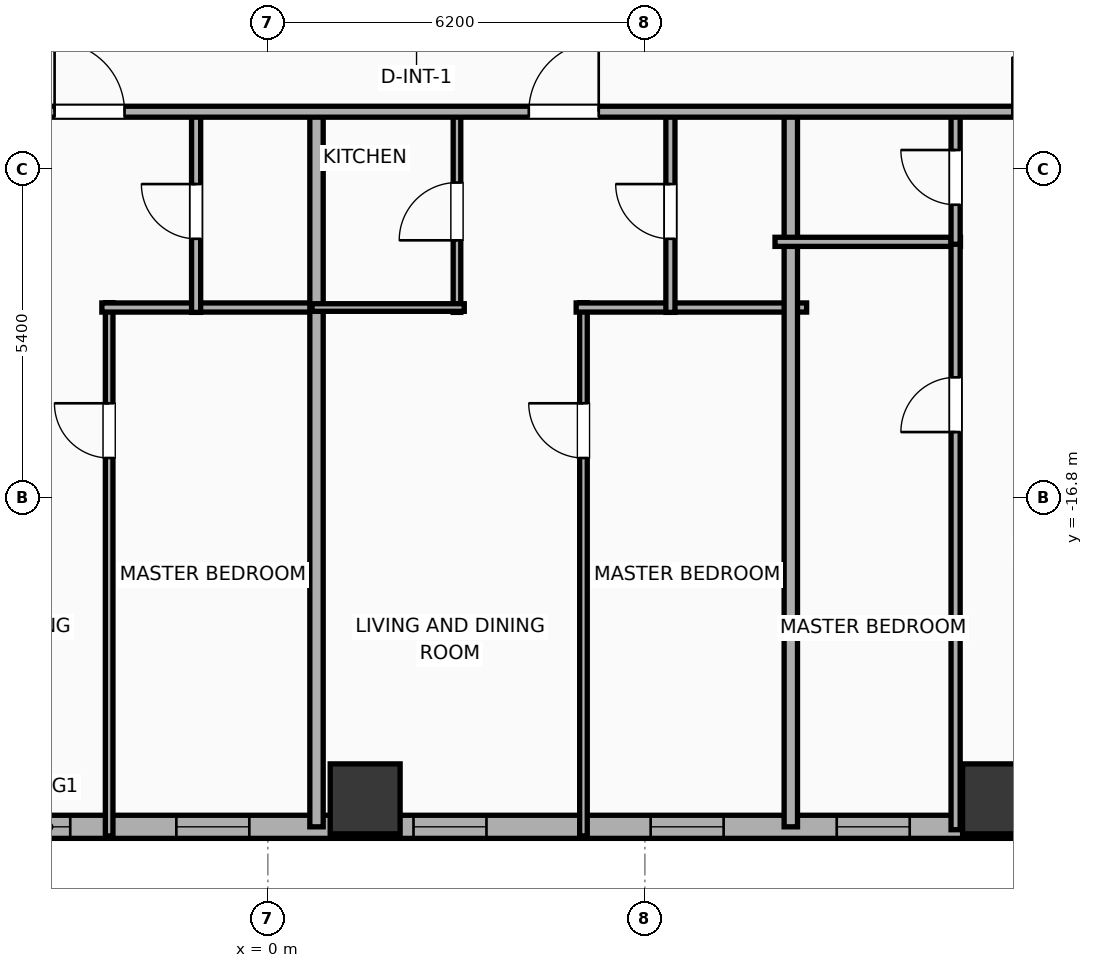
"""IFC4 building model, lengths in metres.
Left out: names, types, materials, properties, quantities, classifications, styles, units other than length and angle.
Written with IfcOpenShell. Run it as: python <this file> out.ifc"""

import sys

from ifc_helpers import new_model, si_unit, direction, frame, frame_2d, origin, origin_2d, place, context, subcontext, project, spatial, rectangle, hollow_rectangle, extrude, element, fill, save


model = new_model("IFC4")
c1 = context("Model", 3, precision=1e-05, world=origin(), true_north=direction((0.0, 1.0)))
c2 = subcontext(c1, "Body", "Model", "MODEL_VIEW")
j1 = project(units=[si_unit("LENGTHUNIT", "METRE"), si_unit("PLANEANGLEUNIT", "RADIAN")], contexts=[c1])
p1 = place(None, origin())
s1 = spatial("IfcSite", under=j1, at=p1, CompositionType="ELEMENT")
p2 = place(p1, origin())
s2 = spatial("IfcBuilding", under=s1, at=p2, CompositionType="ELEMENT")
p3 = place(p2, frame((0.0, 0.0, 57.2)))
s3 = spatial("IfcBuildingStorey", under=s2, at=p3, CompositionType="ELEMENT", Elevation=57.2)
for number, where, z_axis, x_axis in (
    (1, (1.6, -21.75, 0.0), (0.0, 0.0, 1.0), (1.0, 0.0, 0.0)),
    (2, (12.0, -21.75, 0.0), (0.0, 0.0, 1.0), (1.0, 0.0, 0.0)),
):
    element("IfcColumn", number, at=place(p3, frame(where, z_axis=z_axis, x_axis=x_axis)), inside=s3, PredefinedType="COLUMN", context=c2, shape_type="SweptSolid", body=[
        extrude(hollow_rectangle(XDim=1.15, YDim=1.15, WallThickness=0.04, at=origin_2d()), origin(), (0.0, 0.0, 1.0), 3.9),
    ])
p4 = place(p3, frame((22.381, -22.21, 0.0), z_axis=(0.0, 0.0, 1.0), x_axis=(-1.0, 0.0, 0.0)))
e3 = element("IfcWall", 3, at=p4, inside=s3, PredefinedType="ELEMENTEDWALL", context=c2, shape_type="SweptSolid", body=[
    extrude(rectangle(XDim=51.963, YDim=0.38, at=frame_2d((25.981, 0.0))), origin(), (0.0, 0.0, 1.0), 3.65),
])
p5 = place(p4, frame((6.61, 0.0, 0.75)))
e4 = element("IfcOpeningElement", 4, at=p5, cuts=e3, PredefinedType="OPENING", context=c2, shape_type="SweptSolid", body=[
    extrude(rectangle(XDim=2.4, YDim=2.1, at=frame_2d((1.2, 1.05))), frame((0.0, 0.2, 0.0), z_axis=(0.0, -1.0, 0.0), x_axis=(1.0, 0.0, 0.0)), (0.0, 0.0, 1.0), 0.4),
])
p6 = place(p4, frame((25.631, 0.0, 0.75)))
e5 = element("IfcOpeningElement", 5, at=p6, cuts=e3, PredefinedType="OPENING", context=c2, shape_type="SweptSolid", body=[
    extrude(rectangle(XDim=2.4, YDim=2.1, at=frame_2d((1.2, 1.05))), frame((0.0, 0.2, 0.0), z_axis=(0.0, -1.0, 0.0), x_axis=(1.0, 0.0, 0.0)), (0.0, 0.0, 1.0), 0.4),
])
p7 = place(p4, frame((49.132, 0.0, 0.75)))
e6 = element("IfcOpeningElement", 6, at=p7, cuts=e3, PredefinedType="OPENING", context=c2, shape_type="SweptSolid", body=[
    extrude(rectangle(XDim=1.2, YDim=2.05, at=frame_2d((0.6, 1.025))), frame((0.0, 0.2, 0.0), z_axis=(0.0, -1.0, 0.0), x_axis=(1.0, 0.0, 0.0)), (0.0, 0.0, 1.0), 0.4),
])
p8 = place(p4, frame((46.086, 0.0, 0.75)))
e7 = element("IfcOpeningElement", 7, at=p8, cuts=e3, PredefinedType="OPENING", context=c2, shape_type="SweptSolid", body=[
    extrude(rectangle(XDim=1.2, YDim=2.05, at=frame_2d((0.6, 1.025))), frame((0.0, 0.2, 0.0), z_axis=(0.0, -1.0, 0.0), x_axis=(1.0, 0.0, 0.0)), (0.0, 0.0, 1.0), 0.4),
])
p9 = place(p4, frame((42.426, 0.0, 0.75)))
e8 = element("IfcOpeningElement", 8, at=p9, cuts=e3, PredefinedType="OPENING", context=c2, shape_type="SweptSolid", body=[
    extrude(rectangle(XDim=1.2, YDim=2.05, at=frame_2d((0.6, 1.025))), frame((0.0, 0.2, 0.0), z_axis=(0.0, -1.0, 0.0), x_axis=(1.0, 0.0, 0.0)), (0.0, 0.0, 1.0), 0.4),
])
p10 = place(p4, frame((38.286, 0.0, 0.75)))
e9 = element("IfcOpeningElement", 9, at=p10, cuts=e3, PredefinedType="OPENING", context=c2, shape_type="SweptSolid", body=[
    extrude(rectangle(XDim=1.2, YDim=2.05, at=frame_2d((0.6, 1.025))), frame((0.0, 0.2, 0.0), z_axis=(0.0, -1.0, 0.0), x_axis=(1.0, 0.0, 0.0)), (0.0, 0.0, 1.0), 0.4),
])
p11 = place(p4, frame((35.219, 0.0, 0.75)))
e10 = element("IfcOpeningElement", 10, at=p11, cuts=e3, PredefinedType="OPENING", context=c2, shape_type="SweptSolid", body=[
    extrude(rectangle(XDim=1.2, YDim=2.05, at=frame_2d((0.6, 1.025))), frame((0.0, 0.2, 0.0), z_axis=(0.0, -1.0, 0.0), x_axis=(1.0, 0.0, 0.0)), (0.0, 0.0, 1.0), 0.4),
])
p12 = place(p4, frame((32.039, 0.0, 0.75)))
e11 = element("IfcOpeningElement", 11, at=p12, cuts=e3, PredefinedType="OPENING", context=c2, shape_type="SweptSolid", body=[
    extrude(rectangle(XDim=1.2, YDim=2.05, at=frame_2d((0.6, 1.025))), frame((0.0, 0.2, 0.0), z_axis=(0.0, -1.0, 0.0), x_axis=(1.0, 0.0, 0.0)), (0.0, 0.0, 1.0), 0.4),
])
p13 = place(p4, frame((22.686, 0.0, 0.75)))
e12 = element("IfcOpeningElement", 12, at=p13, cuts=e3, PredefinedType="OPENING", context=c2, shape_type="SweptSolid", body=[
    extrude(rectangle(XDim=1.2, YDim=2.05, at=frame_2d((0.6, 1.025))), frame((0.0, 0.2, 0.0), z_axis=(0.0, -1.0, 0.0), x_axis=(1.0, 0.0, 0.0)), (0.0, 0.0, 1.0), 0.4),
])
p14 = place(p4, frame((18.786, 0.0, 0.75)))
e13 = element("IfcOpeningElement", 13, at=p14, cuts=e3, PredefinedType="OPENING", context=c2, shape_type="SweptSolid", body=[
    extrude(rectangle(XDim=1.2, YDim=2.05, at=frame_2d((0.6, 1.025))), frame((0.0, 0.2, 0.0), z_axis=(0.0, -1.0, 0.0), x_axis=(1.0, 0.0, 0.0)), (0.0, 0.0, 1.0), 0.4),
])
p15 = place(p4, frame((14.886, 0.0, 0.75)))
e14 = element("IfcOpeningElement", 14, at=p15, cuts=e3, PredefinedType="OPENING", context=c2, shape_type="SweptSolid", body=[
    extrude(rectangle(XDim=1.2, YDim=2.05, at=frame_2d((0.6, 1.025))), frame((0.0, 0.2, 0.0), z_axis=(0.0, -1.0, 0.0), x_axis=(1.0, 0.0, 0.0)), (0.0, 0.0, 1.0), 0.4),
])
p16 = place(p4, frame((11.826, 0.0, 0.75)))
e15 = element("IfcOpeningElement", 15, at=p16, cuts=e3, PredefinedType="OPENING", context=c2, shape_type="SweptSolid", body=[
    extrude(rectangle(XDim=1.2, YDim=2.05, at=frame_2d((0.6, 1.025))), frame((0.0, 0.2, 0.0), z_axis=(0.0, -1.0, 0.0), x_axis=(1.0, 0.0, 0.0)), (0.0, 0.0, 1.0), 0.4),
])
p17 = place(p4, frame((2.836, 0.0, 0.75)))
e16 = element("IfcOpeningElement", 16, at=p17, cuts=e3, PredefinedType="OPENING", context=c2, shape_type="SweptSolid", body=[
    extrude(rectangle(XDim=1.2, YDim=2.05, at=frame_2d((0.6, 1.025))), frame((0.0, 0.2, 0.0), z_axis=(0.0, -1.0, 0.0), x_axis=(1.0, 0.0, 0.0)), (0.0, 0.0, 1.0), 0.4),
])
p18 = place(p3, frame((-2.61, -22.36, 0.0), z_axis=(0.0, 0.0, 1.0), x_axis=(0.0, 1.0, 0.0)))
e17 = element("IfcWall", 17, at=p18, inside=s3, PredefinedType="PARTITIONING", context=c2, shape_type="SweptSolid", body=[
    extrude(rectangle(XDim=8.77, YDim=0.125, at=frame_2d((4.385, 0.0))), origin(), (0.0, 0.0, 1.0), 3.65),
])
p19 = place(p18, frame((6.215, 0.0, 0.0)))
e18 = element("IfcOpeningElement", 18, at=p19, cuts=e17, PredefinedType="OPENING", context=c2, shape_type="SweptSolid", body=[
    extrude(rectangle(XDim=0.9, YDim=2.05, at=frame_2d((0.45, 1.025))), frame((0.0, 0.073, 0.0), z_axis=(0.0, -1.0, 0.0), x_axis=(1.0, 0.0, 0.0)), (0.0, 0.0, 1.0), 0.145),
])
p20 = place(p3, frame((-2.73, -13.67, 0.0), z_axis=(0.0, 0.0, 1.0), x_axis=(1.0, 0.0, 0.0)))
e19 = element("IfcWall", 19, at=p20, inside=s3, PredefinedType="PLUMBINGWALL", context=c2, shape_type="SweptSolid", body=[
    extrude(rectangle(XDim=3.605, YDim=0.15, at=frame_2d((1.802, 0.0))), origin(), (0.0, 0.0, 1.0), 3.65),
])
p21 = place(p3, frame((-1.18, -13.75, 0.0), z_axis=(0.0, 0.0, 1.0), x_axis=(0.0, 1.0, 0.0)))
e20 = element("IfcWall", 20, at=p21, inside=s3, PredefinedType="PLUMBINGWALL", context=c2, shape_type="SweptSolid", body=[
    extrude(rectangle(XDim=3.32, YDim=0.15, at=frame_2d((1.66, 0.0))), origin(), (0.0, 0.0, 1.0), 3.65),
])
p22 = place(p21, frame((1.21, 0.0, 0.0)))
e21 = element("IfcOpeningElement", 21, at=p22, cuts=e20, PredefinedType="OPENING", context=c2, shape_type="SweptSolid", body=[
    extrude(rectangle(XDim=0.9, YDim=2.05, at=frame_2d((0.45, 1.025))), frame((0.0, 0.085, 0.0), z_axis=(0.0, -1.0, 0.0), x_axis=(1.0, 0.0, 0.0)), (0.0, 0.0, 1.0), 0.17),
])
p23 = place(p3, frame((0.8, -22.21, 0.0), z_axis=(0.0, 0.0, 1.0), x_axis=(0.0, 1.0, 0.0)))
e22 = element("IfcWall", 22, at=p23, inside=s3, PredefinedType="PARTITIONING", context=c2, shape_type="SweptSolid", body=[
    extrude(rectangle(XDim=11.84, YDim=0.22, at=frame_2d((5.92, 0.0))), origin(), (0.0, 0.0, 1.0), 3.65),
])
p24 = place(p3, frame((5.19, -22.36, 0.0), z_axis=(0.0, 0.0, 1.0), x_axis=(0.0, 1.0, 0.0)))
e23 = element("IfcWall", 23, at=p24, inside=s3, PredefinedType="PARTITIONING", context=c2, shape_type="SweptSolid", body=[
    extrude(rectangle(XDim=8.77, YDim=0.125, at=frame_2d((4.385, 0.0))), origin(), (0.0, 0.0, 1.0), 3.65),
])
p25 = place(p24, frame((6.215, 0.0, 0.0)))
e24 = element("IfcOpeningElement", 24, at=p25, cuts=e23, PredefinedType="OPENING", context=c2, shape_type="SweptSolid", body=[
    extrude(rectangle(XDim=0.9, YDim=2.05, at=frame_2d((0.45, 1.025))), frame((0.0, 0.073, 0.0), z_axis=(0.0, -1.0, 0.0), x_axis=(1.0, 0.0, 0.0)), (0.0, 0.0, 1.0), 0.145),
])
p26 = place(p3, frame((5.07, -13.67, 0.0), z_axis=(0.0, 0.0, 1.0), x_axis=(1.0, 0.0, 0.0)))
e25 = element("IfcWall", 25, at=p26, inside=s3, PredefinedType="PLUMBINGWALL", context=c2, shape_type="SweptSolid", body=[
    extrude(rectangle(XDim=3.79, YDim=0.15, at=frame_2d((1.895, 0.0))), origin(), (0.0, 0.0, 1.0), 3.65),
])
p27 = place(p3, frame((3.11, -13.75, 0.0), z_axis=(0.0, 0.0, 1.0), x_axis=(0.0, 1.0, 0.0)))
e26 = element("IfcWall", 26, at=p27, inside=s3, PredefinedType="PARTITIONING", context=c2, shape_type="SweptSolid", body=[
    extrude(rectangle(XDim=3.32, YDim=0.125, at=frame_2d((1.66, 0.0))), origin(), (0.0, 0.0, 1.0), 2.94),
])
p28 = place(p27, frame((1.185, 0.0, 0.0)))
e27 = element("IfcOpeningElement", 27, at=p28, cuts=e26, PredefinedType="OPENING", context=c2, shape_type="SweptSolid", body=[
    extrude(rectangle(XDim=0.95, YDim=2.05, at=frame_2d((0.475, 1.025))), frame((0.0, 0.073, 0.0), z_axis=(0.0, -1.0, 0.0), x_axis=(1.0, 0.0, 0.0)), (0.0, 0.0, 1.0), 0.145),
])
p29 = place(p3, frame((0.725, -13.67, 0.0), z_axis=(0.0, 0.0, 1.0), x_axis=(1.0, 0.0, 0.0)))
e28 = element("IfcWall", 28, at=p29, inside=s3, PredefinedType="PARTITIONING", context=c2, shape_type="SweptSolid", body=[
    extrude(rectangle(XDim=2.505, YDim=0.125, at=frame_2d((1.252, 0.0))), origin(), (0.0, 0.0, 1.0), 3.65),
])
p30 = place(p3, frame((6.62, -13.75, 0.0), z_axis=(0.0, 0.0, 1.0), x_axis=(0.0, 1.0, 0.0)))
e29 = element("IfcWall", 29, at=p30, inside=s3, PredefinedType="PLUMBINGWALL", context=c2, shape_type="SweptSolid", body=[
    extrude(rectangle(XDim=3.32, YDim=0.15, at=frame_2d((1.66, 0.0))), origin(), (0.0, 0.0, 1.0), 3.65),
])
p31 = place(p30, frame((1.21, 0.0, 0.0)))
e30 = element("IfcOpeningElement", 30, at=p31, cuts=e29, PredefinedType="OPENING", context=c2, shape_type="SweptSolid", body=[
    extrude(rectangle(XDim=0.9, YDim=2.05, at=frame_2d((0.45, 1.025))), frame((0.0, 0.085, 0.0), z_axis=(0.0, -1.0, 0.0), x_axis=(1.0, 0.0, 0.0)), (0.0, 0.0, 1.0), 0.17),
])
p32 = place(p3, frame((8.6, -22.21, 0.0), z_axis=(0.0, 0.0, 1.0), x_axis=(0.0, 1.0, 0.0)))
e31 = element("IfcWall", 31, at=p32, inside=s3, PredefinedType="PARTITIONING", context=c2, shape_type="SweptSolid", body=[
    extrude(rectangle(XDim=11.84, YDim=0.22, at=frame_2d((5.92, 0.0))), origin(), (0.0, 0.0, 1.0), 3.65),
])
p33 = place(p3, frame((8.34, -12.59, 0.0), z_axis=(0.0, 0.0, 1.0), x_axis=(1.0, 0.0, 0.0)))
e32 = element("IfcWall", 32, at=p33, inside=s3, PredefinedType="PLUMBINGWALL", context=c2, shape_type="SweptSolid", body=[
    extrude(rectangle(XDim=3.05, YDim=0.15, at=frame_2d((1.525, 0.0))), origin(), (0.0, 0.0, 1.0), 3.65),
])
p34 = place(p3, frame((11.31, -22.258, 0.0), z_axis=(0.0, 0.0, 1.0), x_axis=(0.0, 1.0, 0.0)))
e33 = element("IfcWall", 33, at=p34, inside=s3, PredefinedType="PLUMBINGWALL", context=c2, shape_type="SweptSolid", body=[
    extrude(rectangle(XDim=9.708, YDim=0.15, at=frame_2d((4.854, 0.0))), origin(), (0.0, 0.0, 1.0), 3.65),
])
p35 = place(p34, frame((6.54, 0.0, 0.0)))
e34 = element("IfcOpeningElement", 34, at=p35, cuts=e33, PredefinedType="OPENING", context=c2, shape_type="SweptSolid", body=[
    extrude(rectangle(XDim=0.9, YDim=2.05, at=frame_2d((0.45, 1.025))), frame((0.0, 0.085, 0.0), z_axis=(0.0, -1.0, 0.0), x_axis=(1.0, 0.0, 0.0)), (0.0, 0.0, 1.0), 0.17),
])
p36 = place(p3, frame((11.31, -12.63, 0.0), z_axis=(0.0, 0.0, 1.0), x_axis=(0.0, 1.0, 0.0)))
e35 = element("IfcWall", 35, at=p36, inside=s3, PredefinedType="PLUMBINGWALL", context=c2, shape_type="SweptSolid", body=[
    extrude(rectangle(XDim=2.2, YDim=0.15, at=frame_2d((1.1, 0.0))), origin(), (0.0, 0.0, 1.0), 3.65),
])
p37 = place(p36, frame((0.65, 0.0, 0.0)))
e36 = element("IfcOpeningElement", 36, at=p37, cuts=e35, PredefinedType="OPENING", context=c2, shape_type="SweptSolid", body=[
    extrude(rectangle(XDim=0.9, YDim=2.05, at=frame_2d((0.45, 1.025))), frame((0.0, 0.085, 0.0), z_axis=(0.0, -1.0, 0.0), x_axis=(1.0, 0.0, 0.0)), (0.0, 0.0, 1.0), 0.17),
])
p38 = place(p3, frame((-33.41, -10.45, 0.0), z_axis=(0.0, 0.0, 1.0), x_axis=(1.0, 0.0, 0.0)))
e37 = element("IfcWall", 37, at=p38, inside=s3, PredefinedType="PARTITIONING", context=c2, shape_type="SweptSolid", body=[
    extrude(rectangle(XDim=59.62, YDim=0.18, at=frame_2d((29.81, 0.0))), origin(), (0.0, 0.0, 1.0), 3.65),
])
p39 = place(p38, frame((5.321, 0.0, 0.0)))
e38 = element("IfcOpeningElement", 38, at=p39, cuts=e37, PredefinedType="OPENING", context=c2, shape_type="SweptSolid", body=[
    extrude(rectangle(XDim=1.15, YDim=2.05, at=frame_2d((0.575, 1.025))), frame((0.0, 0.1, 0.0), z_axis=(0.0, -1.0, 0.0), x_axis=(1.0, 0.0, 0.0)), (0.0, 0.0, 1.0), 0.2),
])
p40 = place(p38, frame((14.3, 0.0, 0.0)))
e39 = element("IfcOpeningElement", 39, at=p40, cuts=e37, PredefinedType="OPENING", context=c2, shape_type="SweptSolid", body=[
    extrude(rectangle(XDim=1.15, YDim=2.05, at=frame_2d((0.575, 1.025))), frame((0.0, 0.1, 0.0), z_axis=(0.0, -1.0, 0.0), x_axis=(1.0, 0.0, 0.0)), (0.0, 0.0, 1.0), 0.2),
])
p41 = place(p38, frame((22.265, 0.0, 0.0)))
e40 = element("IfcOpeningElement", 40, at=p41, cuts=e37, PredefinedType="OPENING", context=c2, shape_type="SweptSolid", body=[
    extrude(rectangle(XDim=0.9, YDim=2.05, at=frame_2d((0.45, 1.025))), frame((0.0, 0.1, 0.0), z_axis=(0.0, -1.0, 0.0), x_axis=(1.0, 0.0, 0.0)), (0.0, 0.0, 1.0), 0.2),
])
p42 = place(p38, frame((29.903, 0.0, 0.0)))
e41 = element("IfcOpeningElement", 41, at=p42, cuts=e37, PredefinedType="OPENING", context=c2, shape_type="SweptSolid", body=[
    extrude(rectangle(XDim=1.15, YDim=2.05, at=frame_2d((0.575, 1.025))), frame((0.0, 0.1, 0.0), z_axis=(0.0, -1.0, 0.0), x_axis=(1.0, 0.0, 0.0)), (0.0, 0.0, 1.0), 0.2),
])
p43 = place(p38, frame((37.701, 0.0, 0.0)))
e42 = element("IfcOpeningElement", 42, at=p43, cuts=e37, PredefinedType="OPENING", context=c2, shape_type="SweptSolid", body=[
    extrude(rectangle(XDim=1.15, YDim=2.05, at=frame_2d((0.575, 1.025))), frame((0.0, 0.1, 0.0), z_axis=(0.0, -1.0, 0.0), x_axis=(1.0, 0.0, 0.0)), (0.0, 0.0, 1.0), 0.2),
])
p44 = place(p38, frame((45.654, 0.0, 0.0)))
e43 = element("IfcOpeningElement", 43, at=p44, cuts=e37, PredefinedType="OPENING", context=c2, shape_type="SweptSolid", body=[
    extrude(rectangle(XDim=0.9, YDim=2.05, at=frame_2d((0.45, 1.025))), frame((0.0, 0.1, 0.0), z_axis=(0.0, -1.0, 0.0), x_axis=(1.0, 0.0, 0.0)), (0.0, 0.0, 1.0), 0.2),
])
p45 = place(p38, frame((54.472, 0.0, 0.0)))
e44 = element("IfcOpeningElement", 44, at=p45, cuts=e37, PredefinedType="OPENING", context=c2, shape_type="SweptSolid", body=[
    extrude(rectangle(XDim=1.15, YDim=2.05, at=frame_2d((0.575, 1.025))), frame((0.0, 0.1, 0.0), z_axis=(0.0, -1.0, 0.0), x_axis=(1.0, 0.0, 0.0)), (0.0, 0.0, 1.0), 0.2),
])
p46 = place(p6, origin())
e45 = element("IfcWindow", 45, at=p46, inside=s3, PartitioningType="SINGLE_PANEL", PredefinedType="WINDOW", context=c2, shape_type="SweptSolid", body=[
    extrude(rectangle(XDim=2.4, YDim=2.1, at=frame_2d((1.2, 1.05))), frame((0.0, 0.03, 0.0), z_axis=(0.0, -1.0, 0.0), x_axis=(1.0, 0.0, 0.0)), (0.0, 0.0, 1.0), 0.06),
])
fill(e5, e45)
p47 = place(p13, origin())
e46 = element("IfcWindow", 46, at=p47, inside=s3, PartitioningType="SINGLE_PANEL", PredefinedType="WINDOW", context=c2, shape_type="SweptSolid", body=[
    extrude(rectangle(XDim=1.2, YDim=2.05, at=frame_2d((0.6, 1.025))), frame((0.0, 0.03, 0.0), z_axis=(0.0, -1.0, 0.0), x_axis=(1.0, 0.0, 0.0)), (0.0, 0.0, 1.0), 0.06),
])
fill(e12, e46)
p48 = place(p14, origin())
e47 = element("IfcWindow", 47, at=p48, inside=s3, PartitioningType="SINGLE_PANEL", PredefinedType="WINDOW", context=c2, shape_type="SweptSolid", body=[
    extrude(rectangle(XDim=1.2, YDim=2.05, at=frame_2d((0.6, 1.025))), frame((0.0, 0.03, 0.0), z_axis=(0.0, -1.0, 0.0), x_axis=(1.0, 0.0, 0.0)), (0.0, 0.0, 1.0), 0.06),
])
fill(e13, e47)
p49 = place(p15, origin())
e48 = element("IfcWindow", 48, at=p49, inside=s3, PartitioningType="SINGLE_PANEL", PredefinedType="WINDOW", context=c2, shape_type="SweptSolid", body=[
    extrude(rectangle(XDim=1.2, YDim=2.05, at=frame_2d((0.6, 1.025))), frame((0.0, 0.03, 0.0), z_axis=(0.0, -1.0, 0.0), x_axis=(1.0, 0.0, 0.0)), (0.0, 0.0, 1.0), 0.06),
])
fill(e14, e48)
p50 = place(p16, origin())
e49 = element("IfcWindow", 49, at=p50, inside=s3, PartitioningType="SINGLE_PANEL", PredefinedType="WINDOW", context=c2, shape_type="SweptSolid", body=[
    extrude(rectangle(XDim=1.2, YDim=2.05, at=frame_2d((0.6, 1.025))), frame((0.0, 0.03, 0.0), z_axis=(0.0, -1.0, 0.0), x_axis=(1.0, 0.0, 0.0)), (0.0, 0.0, 1.0), 0.06),
])
fill(e15, e49)
p51 = place(p19, origin())
e50 = element("IfcDoor", 50, at=p51, inside=s3, OperationType="SINGLE_SWING_RIGHT", PredefinedType="DOOR", context=c2, shape_type="SweptSolid", body=[
    extrude(rectangle(XDim=0.9, YDim=2.05, at=frame_2d((0.45, 1.025))), frame((0.0, 0.025, 0.0), z_axis=(0.0, -1.0, 0.0), x_axis=(1.0, 0.0, 0.0)), (0.0, 0.0, 1.0), 0.05),
])
fill(e18, e50)
p52 = place(p22, origin())
e51 = element("IfcDoor", 51, at=p52, inside=s3, OperationType="SINGLE_SWING_RIGHT", PredefinedType="DOOR", context=c2, shape_type="SweptSolid", body=[
    extrude(rectangle(XDim=0.9, YDim=2.05, at=frame_2d((0.45, 1.025))), frame((0.0, 0.025, 0.0), z_axis=(0.0, -1.0, 0.0), x_axis=(1.0, 0.0, 0.0)), (0.0, 0.0, 1.0), 0.05),
])
fill(e21, e51)
p53 = place(p25, origin())
e52 = element("IfcDoor", 52, at=p53, inside=s3, OperationType="SINGLE_SWING_RIGHT", PredefinedType="DOOR", context=c2, shape_type="SweptSolid", body=[
    extrude(rectangle(XDim=0.9, YDim=2.05, at=frame_2d((0.45, 1.025))), frame((0.0, 0.025, 0.0), z_axis=(0.0, -1.0, 0.0), x_axis=(1.0, 0.0, 0.0)), (0.0, 0.0, 1.0), 0.05),
])
fill(e24, e52)
p54 = place(p28, origin())
e53 = element("IfcDoor", 53, at=p54, inside=s3, OperationType="SINGLE_SWING_LEFT", PredefinedType="DOOR", context=c2, shape_type="SweptSolid", body=[
    extrude(rectangle(XDim=0.95, YDim=2.05, at=frame_2d((0.475, 1.025))), frame((0.0, 0.025, 0.0), z_axis=(0.0, -1.0, 0.0), x_axis=(1.0, 0.0, 0.0)), (0.0, 0.0, 1.0), 0.05),
])
fill(e27, e53)
p55 = place(p31, origin())
e54 = element("IfcDoor", 54, at=p55, inside=s3, OperationType="SINGLE_SWING_RIGHT", PredefinedType="DOOR", context=c2, shape_type="SweptSolid", body=[
    extrude(rectangle(XDim=0.9, YDim=2.05, at=frame_2d((0.45, 1.025))), frame((0.0, 0.025, 0.0), z_axis=(0.0, -1.0, 0.0), x_axis=(1.0, 0.0, 0.0)), (0.0, 0.0, 1.0), 0.05),
])
fill(e30, e54)
p56 = place(p35, origin())
e55 = element("IfcDoor", 55, at=p56, inside=s3, OperationType="SINGLE_SWING_LEFT", PredefinedType="DOOR", context=c2, shape_type="SweptSolid", body=[
    extrude(rectangle(XDim=0.9, YDim=2.05, at=frame_2d((0.45, 1.025))), frame((0.0, 0.025, 0.0), z_axis=(0.0, -1.0, 0.0), x_axis=(1.0, 0.0, 0.0)), (0.0, 0.0, 1.0), 0.05),
])
fill(e34, e55)
p57 = place(p37, origin())
e56 = element("IfcDoor", 56, at=p57, inside=s3, OperationType="SINGLE_SWING_RIGHT", PredefinedType="DOOR", context=c2, shape_type="SweptSolid", body=[
    extrude(rectangle(XDim=0.9, YDim=2.05, at=frame_2d((0.45, 1.025))), frame((0.0, 0.025, 0.0), z_axis=(0.0, -1.0, 0.0), x_axis=(1.0, 0.0, 0.0)), (0.0, 0.0, 1.0), 0.05),
])
fill(e36, e56)
p58 = place(p42, origin())
e57 = element("IfcDoor", 57, at=p58, inside=s3, OperationType="SINGLE_SWING_LEFT", PredefinedType="DOOR", context=c2, shape_type="SweptSolid", body=[
    extrude(rectangle(XDim=1.15, YDim=2.05, at=frame_2d((0.575, 1.025))), frame((0.0, 0.025, 0.0), z_axis=(0.0, -1.0, 0.0), x_axis=(1.0, 0.0, 0.0)), (0.0, 0.0, 1.0), 0.05),
])
fill(e41, e57)
p59 = place(p43, origin())
e58 = element("IfcDoor", 58, at=p59, inside=s3, OperationType="SINGLE_SWING_RIGHT", PredefinedType="DOOR", context=c2, shape_type="SweptSolid", body=[
    extrude(rectangle(XDim=1.15, YDim=2.05, at=frame_2d((0.575, 1.025))), frame((0.0, 0.025, 0.0), z_axis=(0.0, -1.0, 0.0), x_axis=(1.0, 0.0, 0.0)), (0.0, 0.0, 1.0), 0.05),
])
fill(e42, e58)
p60 = place(p44, origin())
e59 = element("IfcDoor", 59, at=p60, inside=s3, OperationType="SINGLE_SWING_LEFT", PredefinedType="DOOR", context=c2, shape_type="SweptSolid", body=[
    extrude(rectangle(XDim=0.9, YDim=2.05, at=frame_2d((0.45, 1.025))), frame((0.0, 0.025, 0.0), z_axis=(0.0, -1.0, 0.0), x_axis=(1.0, 0.0, 0.0)), (0.0, 0.0, 1.0), 0.05),
])
fill(e43, e59)
save(model, sys.argv[1])
